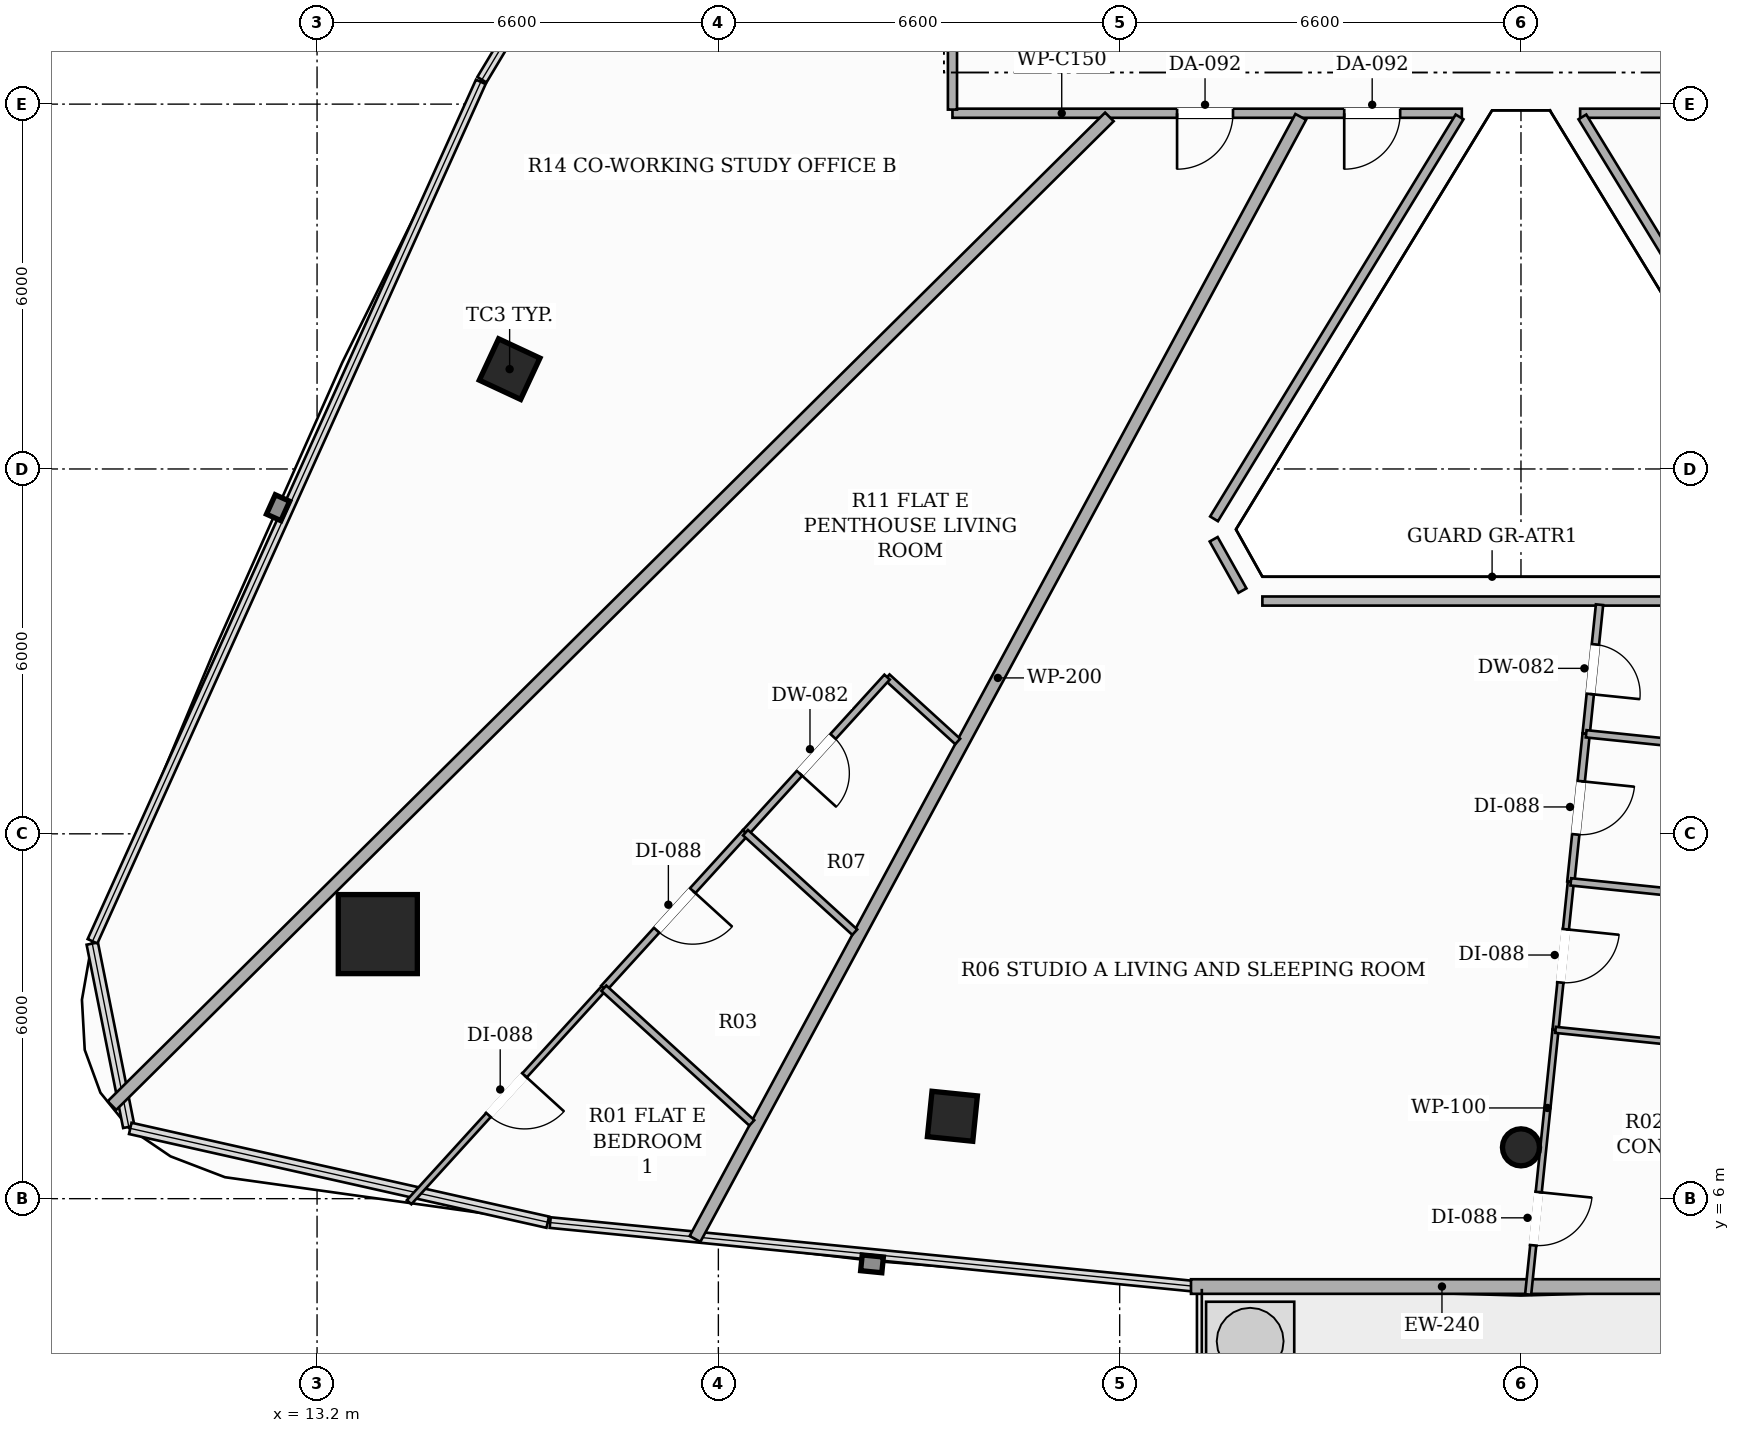
"""IFC4 building model, lengths in metres.
Left out: names, types, materials, properties, quantities, classifications, styles, units other than length and angle.
Written with IfcOpenShell. Run it as: python <this file> out.ifc"""

import sys

from ifc_helpers import new_model, si_unit, direction, frame, frame_2d, origin, origin_2d, place, context, subcontext, project, spatial, rectangle, hollow_rectangle, hollow_circle, extrude, element, fill, save


model = new_model("IFC4")
c1 = context("Model", 3, precision=1e-05, world=origin(), true_north=direction((0.0, 1.0)))
c2 = subcontext(c1, "Body", "Model", "MODEL_VIEW")
j1 = project(units=[si_unit("LENGTHUNIT", "METRE"), si_unit("PLANEANGLEUNIT", "RADIAN")], contexts=[c1])
p1 = place(None, origin())
s1 = spatial("IfcSite", under=j1, at=p1, CompositionType="ELEMENT")
p2 = place(p1, origin())
s2 = spatial("IfcBuilding", under=s1, at=p2, CompositionType="ELEMENT")
p3 = place(p2, frame((0.0, 0.0, 203.0)))
s3 = spatial("IfcBuildingStorey", under=s2, at=p3, CompositionType="ELEMENT", Elevation=203.0)
p4 = place(p3, frame((14.199, 10.351, 0.0), z_axis=(0.0, 0.0, 1.0), x_axis=(1.0, 0.0, 0.0)))
e1 = element("IfcColumn", 1, at=p4, inside=s3, PredefinedType="COLUMN", context=c2, shape_type="SweptSolid", body=[
    extrude(hollow_rectangle(XDim=1.3, YDim=1.3, WallThickness=0.04, at=origin_2d()), origin(), (0.0, 0.0, 1.0), 3.3),
])
for number, where, z_axis, x_axis in (
    (2, (16.367, 19.642, 0.0), (0.0, 0.0, 1.0), (0.423, 0.906, 0.0)),
    (3, (23.649, 7.355, 0.0), (0.0, 0.0, 1.0), (-0.995, 0.101, 0.0)),
):
    element("IfcColumn", number, at=place(p3, frame(where, z_axis=z_axis, x_axis=x_axis)), inside=s3, PredefinedType="COLUMN", context=c2, shape_type="SweptSolid", body=[
        extrude(hollow_rectangle(XDim=0.75, YDim=0.75, WallThickness=0.025, at=origin_2d()), origin(), (0.0, 0.0, 1.0), 3.3),
    ])
p5 = place(p3, frame((33.0, 6.844, 0.0), z_axis=(0.0, 0.0, 1.0), x_axis=(1.0, 0.0, 0.0)))
e4 = element("IfcColumn", 4, at=p5, inside=s3, PredefinedType="COLUMN", context=c2, shape_type="SweptSolid", body=[
    extrude(hollow_circle(Radius=0.305, WallThickness=0.016, at=origin_2d()), origin(), (0.0, 0.0, 1.0), 3.3),
])
p6 = place(p3, frame((27.573, 4.555, 0.0), z_axis=(0.0, 0.0, 1.0), x_axis=(1.0, 0.0, 0.0)))
e5 = element("IfcWall", 5, at=p6, inside=s3, PredefinedType="SOLIDWALL", context=c2, shape_type="SweptSolid", body=[
    extrude(rectangle(XDim=10.854, YDim=0.24, at=frame_2d((5.427, 0.0))), origin(), (0.0, 0.0, 1.0), 2.624),
])
p7 = place(p6, frame((8.355, 0.0, 0.0)))
e6 = element("IfcOpeningElement", 6, at=p7, cuts=e5, PredefinedType="OPENING", context=c2, shape_type="SweptSolid", body=[
    extrude(rectangle(XDim=1.8, YDim=2.2, at=frame_2d((0.9, 1.1))), frame((0.0, 0.13, 0.0), z_axis=(0.0, -1.0, 0.0), x_axis=(1.0, 0.0, 0.0)), (0.0, 0.0, 1.0), 0.26),
])
p8 = place(p3, frame((32.027, 23.85, 0.0), z_axis=(0.0, 0.0, 1.0), x_axis=(-1.0, 0.0, 0.0)))
e7 = element("IfcWall", 7, at=p8, inside=s3, PredefinedType="PARTITIONING", context=c2, shape_type="SweptSolid", body=[
    extrude(rectangle(XDim=8.377, YDim=0.15, at=frame_2d((4.188, 0.0))), origin(), (0.0, 0.0, 1.0), 2.565),
])
p9 = place(p8, frame((1.014, 0.0, 0.0)))
e8 = element("IfcOpeningElement", 8, at=p9, cuts=e7, PredefinedType="OPENING", context=c2, shape_type="SweptSolid", body=[
    extrude(rectangle(XDim=0.92, YDim=2.15, at=frame_2d((0.46, 1.075))), frame((0.0, 0.085, 0.0), z_axis=(0.0, -1.0, 0.0), x_axis=(1.0, 0.0, 0.0)), (0.0, 0.0, 1.0), 0.17),
])
p10 = place(p8, frame((3.763, 0.0, 0.0)))
e9 = element("IfcOpeningElement", 9, at=p10, cuts=e7, PredefinedType="OPENING", context=c2, shape_type="SweptSolid", body=[
    extrude(rectangle(XDim=0.92, YDim=2.15, at=frame_2d((0.46, 1.075))), frame((0.0, 0.085, 0.0), z_axis=(0.0, -1.0, 0.0), x_axis=(1.0, 0.0, 0.0)), (0.0, 0.0, 1.0), 0.17),
])
p11 = place(p3, frame((23.65, 23.91, 0.0), z_axis=(0.0, 0.0, 1.0), x_axis=(0.0, 1.0, 0.0)))
e10 = element("IfcWall", 10, at=p11, inside=s3, PredefinedType="PARTITIONING", context=c2, shape_type="SweptSolid", body=[
    extrude(rectangle(XDim=12.715, YDim=0.15, at=frame_2d((6.357, 0.0))), origin(), (0.0, 0.0, 1.0), 2.492),
])
p12 = place(p11, frame((5.917, 0.0, 0.0)))
e11 = element("IfcOpeningElement", 11, at=p12, cuts=e10, PredefinedType="OPENING", context=c2, shape_type="SweptSolid", body=[
    extrude(rectangle(XDim=0.88, YDim=2.1, at=frame_2d((0.44, 1.05))), frame((0.0, 0.085, 0.0), z_axis=(0.0, -1.0, 0.0), x_axis=(1.0, 0.0, 0.0)), (0.0, 0.0, 1.0), 0.17),
])
p13 = place(p3, frame((42.19, 23.85, 0.0), z_axis=(0.0, 0.0, 1.0), x_axis=(-1.0, 0.0, 0.0)))
e12 = element("IfcWall", 12, at=p13, inside=s3, PredefinedType="PARTITIONING", context=c2, shape_type="SweptSolid", body=[
    extrude(rectangle(XDim=8.217, YDim=0.15, at=frame_2d((4.108, 0.0))), origin(), (0.0, 0.0, 1.0), 2.565),
])
p14 = place(p13, frame((1.67, 0.0, 0.0)))
e13 = element("IfcOpeningElement", 13, at=p14, cuts=e12, PredefinedType="OPENING", context=c2, shape_type="SweptSolid", body=[
    extrude(rectangle(XDim=0.92, YDim=2.15, at=frame_2d((0.46, 1.075))), frame((0.0, 0.085, 0.0), z_axis=(0.0, -1.0, 0.0), x_axis=(1.0, 0.0, 0.0)), (0.0, 0.0, 1.0), 0.17),
])
p15 = place(p13, frame((5.12, 0.0, 0.0)))
e14 = element("IfcOpeningElement", 14, at=p15, cuts=e12, PredefinedType="OPENING", context=c2, shape_type="SweptSolid", body=[
    extrude(rectangle(XDim=0.88, YDim=2.1, at=frame_2d((0.44, 1.05))), frame((0.0, 0.085, 0.0), z_axis=(0.0, -1.0, 0.0), x_axis=(1.0, 0.0, 0.0)), (0.0, 0.0, 1.0), 0.17),
])
p16 = place(p3, frame((34.01, 23.79, 0.0), z_axis=(0.0, 0.0, 1.0), x_axis=(0.521316137909, -0.853363629618, 0.0)))
e15 = element("IfcWall", 15, at=p16, inside=s3, PredefinedType="PARTITIONING", context=c2, shape_type="SweptSolid", body=[
    extrude(rectangle(XDim=7.746, YDim=0.15, at=frame_2d((3.873, 0.0))), origin(), (0.0, 0.0, 1.0), 2.773),
])
p17 = place(p3, frame((37.253, 15.828, 0.0), z_axis=(0.0, 0.0, 1.0), x_axis=(-1.0, 0.0, 0.0)))
e16 = element("IfcWall", 16, at=p17, inside=s3, PredefinedType="PARTITIONING", context=c2, shape_type="SweptSolid", body=[
    extrude(rectangle(XDim=8.506, YDim=0.15, at=frame_2d((4.253, 0.0))), origin(), (0.0, 0.0, 1.0), 2.773),
])
p18 = place(p3, frame((28.419, 16.0, 0.0), z_axis=(0.0, 0.0, 1.0), x_axis=(-0.488810833005, 0.872389803664, 0.0)))
e17 = element("IfcWall", 17, at=p18, inside=s3, PredefinedType="PARTITIONING", context=c2, shape_type="SweptSolid", body=[
    extrude(rectangle(XDim=0.968, YDim=0.15, at=frame_2d((0.484, 0.0))), origin(), (0.0, 0.0, 1.0), 3.06),
])
p19 = place(p3, frame((27.952, 17.18, 0.0), z_axis=(0.0, 0.0, 1.0), x_axis=(0.521316137909, 0.853363629618, 0.0)))
e18 = element("IfcWall", 18, at=p19, inside=s3, PredefinedType="PARTITIONING", context=c2, shape_type="SweptSolid", body=[
    extrude(rectangle(XDim=7.746, YDim=0.15, at=frame_2d((3.873, 0.0))), origin(), (0.0, 0.0, 1.0), 2.773),
])
p20 = place(p3, frame((19.416, 5.338, 0.0), z_axis=(0.0, 0.0, 1.0), x_axis=(0.475065982754, 0.879950175879, 0.0)))
e19 = element("IfcWall", 19, at=p20, inside=s3, PredefinedType="PARTITIONING", context=c2, shape_type="SweptSolid", body=[
    extrude(rectangle(XDim=20.969, YDim=0.2, at=frame_2d((10.485, 0.0))), origin(), (0.0, 0.0, 1.0), 2.492),
])
p21 = place(p3, frame((26.231, 23.79, 0.0), z_axis=(0.0, 0.0, 1.0), x_axis=(-0.710239236144, -0.703960387693, 0.0)))
e20 = element("IfcWall", 20, at=p21, inside=s3, PredefinedType="PARTITIONING", context=c2, shape_type="SweptSolid", body=[
    extrude(rectangle(XDim=23.096, YDim=0.2, at=frame_2d((11.548, 0.0))), origin(), (0.0, 0.0, 1.0), 2.492),
])
p22 = place(p3, frame((34.292, 15.768, 0.0), z_axis=(0.0, 0.0, 1.0), x_axis=(-0.103059151492, -0.994675229054, 0.0)))
e21 = element("IfcWall", 21, at=p22, inside=s3, PredefinedType="PARTITIONING", context=c2, shape_type="SweptSolid", body=[
    extrude(rectangle(XDim=2.135, YDim=0.12, at=frame_2d((1.067, 0.0))), origin(), (0.0, 0.0, 1.0), 3.06),
])
p23 = place(p22, frame((0.657, 0.0, 0.0)))
e22 = element("IfcOpeningElement", 22, at=p23, cuts=e21, PredefinedType="OPENING", context=c2, shape_type="SweptSolid", body=[
    extrude(rectangle(XDim=0.82, YDim=2.1, at=frame_2d((0.41, 1.05))), frame((0.0, 0.07, 0.0), z_axis=(0.0, -1.0, 0.0), x_axis=(1.0, 0.0, 0.0)), (0.0, 0.0, 1.0), 0.14),
])
p24 = place(p3, frame((34.072, 13.645, 0.0), z_axis=(0.0, 0.0, 1.0), x_axis=(-0.102919566026, -0.994689681724, 0.0)))
e23 = element("IfcWall", 23, at=p24, inside=s3, PredefinedType="PARTITIONING", context=c2, shape_type="SweptSolid", body=[
    extrude(rectangle(XDim=2.448, YDim=0.12, at=frame_2d((1.224, 0.0))), origin(), (0.0, 0.0, 1.0), 3.06),
])
p25 = place(p24, frame((0.784, 0.0, 0.0)))
e24 = element("IfcOpeningElement", 24, at=p25, cuts=e23, PredefinedType="OPENING", context=c2, shape_type="SweptSolid", body=[
    extrude(rectangle(XDim=0.88, YDim=2.1, at=frame_2d((0.44, 1.05))), frame((0.0, 0.07, 0.0), z_axis=(0.0, -1.0, 0.0), x_axis=(1.0, 0.0, 0.0)), (0.0, 0.0, 1.0), 0.14),
])
p26 = place(p3, frame((33.568, 8.776, 0.0), z_axis=(0.0, 0.0, 1.0), x_axis=(-0.1029239069, -0.994689232569, 0.0)))
e25 = element("IfcWall", 25, at=p26, inside=s3, PredefinedType="PARTITIONING", context=c2, shape_type="SweptSolid", body=[
    extrude(rectangle(XDim=4.374, YDim=0.1, at=frame_2d((2.187, 0.0))), origin(), (0.0, 0.0, 1.0), 2.492),
])
p27 = place(p26, frame((2.682, 0.0, 0.0)))
e26 = element("IfcOpeningElement", 26, at=p27, cuts=e25, PredefinedType="OPENING", context=c2, shape_type="SweptSolid", body=[
    extrude(rectangle(XDim=0.88, YDim=2.1, at=frame_2d((0.44, 1.05))), frame((0.0, 0.06, 0.0), z_axis=(0.0, -1.0, 0.0), x_axis=(1.0, 0.0, 0.0)), (0.0, 0.0, 1.0), 0.12),
])
p28 = place(p3, frame((33.82, 11.21, 0.0), z_axis=(0.0, 0.0, 1.0), x_axis=(-0.102960420087, -0.994685453747, 0.0)))
e27 = element("IfcWall", 27, at=p28, inside=s3, PredefinedType="PARTITIONING", context=c2, shape_type="SweptSolid", body=[
    extrude(rectangle(XDim=2.447, YDim=0.1, at=frame_2d((1.224, 0.0))), origin(), (0.0, 0.0, 1.0), 3.06),
])
p29 = place(p28, frame((0.784, 0.0, 0.0)))
e28 = element("IfcOpeningElement", 28, at=p29, cuts=e27, PredefinedType="OPENING", context=c2, shape_type="SweptSolid", body=[
    extrude(rectangle(XDim=0.88, YDim=2.1, at=frame_2d((0.44, 1.05))), frame((0.0, 0.06, 0.0), z_axis=(0.0, -1.0, 0.0), x_axis=(1.0, 0.0, 0.0)), (0.0, 0.0, 1.0), 0.12),
])
p30 = place(p3, frame((38.025, 13.236, 0.0), z_axis=(0.0, 0.0, 1.0), x_axis=(-0.99469136016, 0.102903343108, 0.0)))
e29 = element("IfcWall", 29, at=p30, inside=s3, PredefinedType="PARTITIONING", context=c2, shape_type="SweptSolid", body=[
    extrude(rectangle(XDim=3.974, YDim=0.12, at=frame_2d((1.987, 0.0))), origin(), (0.0, 0.0, 1.0), 2.773),
])
p31 = place(p3, frame((38.777, 10.698, 0.0), z_axis=(0.0, 0.0, 1.0), x_axis=(-0.994708898019, 0.102733676081, 0.0)))
e30 = element("IfcWall", 30, at=p31, inside=s3, PredefinedType="PARTITIONING", context=c2, shape_type="SweptSolid", body=[
    extrude(rectangle(XDim=4.983, YDim=0.12, at=frame_2d((2.492, 0.0))), origin(), (0.0, 0.0, 1.0), 2.773),
])
p32 = place(p3, frame((33.568, 8.776, 0.0), z_axis=(0.0, 0.0, 1.0), x_axis=(0.994686760155, -0.102947798284, 0.0)))
e31 = element("IfcWall", 31, at=p32, inside=s3, PredefinedType="PARTITIONING", context=c2, shape_type="SweptSolid", body=[
    extrude(rectangle(XDim=5.993, YDim=0.1, at=frame_2d((2.996, 0.0))), origin(), (0.0, 0.0, 1.0), 2.773),
])
p33 = place(p3, frame((23.736, 13.519, 0.0), z_axis=(0.0, 0.0, 1.0), x_axis=(-0.739215251716, 0.673469235846, 0.0)))
e32 = element("IfcWall", 32, at=p33, inside=s3, PredefinedType="PARTITIONING", context=c2, shape_type="SweptSolid", body=[
    extrude(rectangle(XDim=1.571, YDim=0.12, at=frame_2d((0.785, 0.0))), origin(), (0.0, 0.0, 1.0), 3.06),
])
p34 = place(p3, frame((22.575, 14.577, 0.0), z_axis=(0.0, 0.0, 1.0), x_axis=(-0.673231148277, -0.739432093563, 0.0)))
e33 = element("IfcWall", 33, at=p34, inside=s3, PredefinedType="PARTITIONING", context=c2, shape_type="SweptSolid", body=[
    extrude(rectangle(XDim=3.459, YDim=0.12, at=frame_2d((1.729, 0.0))), origin(), (0.0, 0.0, 1.0), 2.773),
])
p35 = place(p34, frame((1.32, 0.0, 0.0)))
e34 = element("IfcOpeningElement", 34, at=p35, cuts=e33, PredefinedType="OPENING", context=c2, shape_type="SweptSolid", body=[
    extrude(rectangle(XDim=0.82, YDim=2.1, at=frame_2d((0.41, 1.05))), frame((0.0, 0.07, 0.0), z_axis=(0.0, -1.0, 0.0), x_axis=(1.0, 0.0, 0.0)), (0.0, 0.0, 1.0), 0.14),
])
p36 = place(p3, frame((20.246, 12.019, 0.0), z_axis=(0.0, 0.0, 1.0), x_axis=(-0.673234602732, -0.739428948368, 0.0)))
e35 = element("IfcWall", 35, at=p36, inside=s3, PredefinedType="PARTITIONING", context=c2, shape_type="SweptSolid", body=[
    extrude(rectangle(XDim=3.459, YDim=0.12, at=frame_2d((1.73, 0.0))), origin(), (0.0, 0.0, 1.0), 2.492),
])
p37 = place(p36, frame((1.29, 0.0, 0.0)))
e36 = element("IfcOpeningElement", 36, at=p37, cuts=e35, PredefinedType="OPENING", context=c2, shape_type="SweptSolid", body=[
    extrude(rectangle(XDim=0.88, YDim=2.1, at=frame_2d((0.44, 1.05))), frame((0.0, 0.07, 0.0), z_axis=(0.0, -1.0, 0.0), x_axis=(1.0, 0.0, 0.0)), (0.0, 0.0, 1.0), 0.14),
])
p38 = place(p3, frame((17.917, 9.461, 0.0), z_axis=(0.0, 0.0, 1.0), x_axis=(-0.673104266943, -0.739547595374, 0.0)))
e37 = element("IfcWall", 37, at=p38, inside=s3, PredefinedType="PARTITIONING", context=c2, shape_type="SweptSolid", body=[
    extrude(rectangle(XDim=4.758, YDim=0.1, at=frame_2d((2.379, 0.0))), origin(), (0.0, 0.0, 1.0), 2.492),
])
p39 = place(p38, frame((1.939, 0.0, 0.0)))
e38 = element("IfcOpeningElement", 38, at=p39, cuts=e37, PredefinedType="OPENING", context=c2, shape_type="SweptSolid", body=[
    extrude(rectangle(XDim=0.88, YDim=2.1, at=frame_2d((0.44, 1.05))), frame((0.0, 0.06, 0.0), z_axis=(0.0, -1.0, 0.0), x_axis=(1.0, 0.0, 0.0)), (0.0, 0.0, 1.0), 0.12),
])
p40 = place(p3, frame((22.043, 10.383, 0.0), z_axis=(0.0, 0.0, 1.0), x_axis=(-0.739435258465, 0.673227672143, 0.0)))
e39 = element("IfcWall", 39, at=p40, inside=s3, PredefinedType="PARTITIONING", context=c2, shape_type="SweptSolid", body=[
    extrude(rectangle(XDim=2.43, YDim=0.12, at=frame_2d((1.215, 0.0))), origin(), (0.0, 0.0, 1.0), 2.773),
])
p41 = place(p3, frame((20.35, 7.246, 0.0), z_axis=(0.0, 0.0, 1.0), x_axis=(-0.739496715577, 0.673160164932, 0.0)))
e40 = element("IfcWall", 40, at=p41, inside=s3, PredefinedType="PARTITIONING", context=c2, shape_type="SweptSolid", body=[
    extrude(rectangle(XDim=3.29, YDim=0.12, at=frame_2d((1.645, 0.0))), origin(), (0.0, 0.0, 1.0), 2.492),
])
p42 = place(p9, origin())
e41 = element("IfcDoor", 41, at=p42, inside=s3, OperationType="SINGLE_SWING_RIGHT", PredefinedType="DOOR", context=c2, shape_type="SweptSolid", body=[
    extrude(rectangle(XDim=0.92, YDim=2.15, at=frame_2d((0.46, 1.075))), frame((0.0, 0.025, 0.0), z_axis=(0.0, -1.0, 0.0), x_axis=(1.0, 0.0, 0.0)), (0.0, 0.0, 1.0), 0.05),
])
fill(e8, e41)
p43 = place(p23, origin())
e42 = element("IfcDoor", 42, at=p43, inside=s3, OperationType="SINGLE_SWING_RIGHT", PredefinedType="DOOR", context=c2, shape_type="SweptSolid", body=[
    extrude(rectangle(XDim=0.82, YDim=2.1, at=frame_2d((0.41, 1.05))), frame((0.0, 0.025, 0.0), z_axis=(0.0, -1.0, 0.0), x_axis=(1.0, 0.0, 0.0)), (0.0, 0.0, 1.0), 0.05),
])
fill(e22, e42)
p44 = place(p25, origin())
e43 = element("IfcDoor", 43, at=p44, inside=s3, OperationType="SINGLE_SWING_LEFT", PredefinedType="DOOR", context=c2, shape_type="SweptSolid", body=[
    extrude(rectangle(XDim=0.88, YDim=2.1, at=frame_2d((0.44, 1.05))), frame((0.0, 0.025, 0.0), z_axis=(0.0, -1.0, 0.0), x_axis=(1.0, 0.0, 0.0)), (0.0, 0.0, 1.0), 0.05),
])
fill(e24, e43)
p45 = place(p27, origin())
e44 = element("IfcDoor", 44, at=p45, inside=s3, OperationType="SINGLE_SWING_LEFT", PredefinedType="DOOR", context=c2, shape_type="SweptSolid", body=[
    extrude(rectangle(XDim=0.88, YDim=2.1, at=frame_2d((0.44, 1.05))), frame((0.0, 0.025, 0.0), z_axis=(0.0, -1.0, 0.0), x_axis=(1.0, 0.0, 0.0)), (0.0, 0.0, 1.0), 0.05),
])
fill(e26, e44)
p46 = place(p29, origin())
e45 = element("IfcDoor", 45, at=p46, inside=s3, OperationType="SINGLE_SWING_LEFT", PredefinedType="DOOR", context=c2, shape_type="SweptSolid", body=[
    extrude(rectangle(XDim=0.88, YDim=2.1, at=frame_2d((0.44, 1.05))), frame((0.0, 0.025, 0.0), z_axis=(0.0, -1.0, 0.0), x_axis=(1.0, 0.0, 0.0)), (0.0, 0.0, 1.0), 0.05),
])
fill(e28, e45)
p47 = place(p10, origin())
e46 = element("IfcDoor", 46, at=p47, inside=s3, OperationType="SINGLE_SWING_RIGHT", PredefinedType="DOOR", context=c2, shape_type="SweptSolid", body=[
    extrude(rectangle(XDim=0.92, YDim=2.15, at=frame_2d((0.46, 1.075))), frame((0.0, 0.025, 0.0), z_axis=(0.0, -1.0, 0.0), x_axis=(1.0, 0.0, 0.0)), (0.0, 0.0, 1.0), 0.05),
])
fill(e9, e46)
p48 = place(p35, origin())
e47 = element("IfcDoor", 47, at=p48, inside=s3, OperationType="SINGLE_SWING_RIGHT", PredefinedType="DOOR", context=c2, shape_type="SweptSolid", body=[
    extrude(rectangle(XDim=0.82, YDim=2.1, at=frame_2d((0.41, 1.05))), frame((0.0, 0.025, 0.0), z_axis=(0.0, -1.0, 0.0), x_axis=(1.0, 0.0, 0.0)), (0.0, 0.0, 1.0), 0.05),
])
fill(e34, e47)
p49 = place(p37, origin())
e48 = element("IfcDoor", 48, at=p49, inside=s3, OperationType="SINGLE_SWING_LEFT", PredefinedType="DOOR", context=c2, shape_type="SweptSolid", body=[
    extrude(rectangle(XDim=0.88, YDim=2.1, at=frame_2d((0.44, 1.05))), frame((0.0, 0.025, 0.0), z_axis=(0.0, -1.0, 0.0), x_axis=(1.0, 0.0, 0.0)), (0.0, 0.0, 1.0), 0.05),
])
fill(e36, e48)
p50 = place(p39, origin())
e49 = element("IfcDoor", 49, at=p50, inside=s3, OperationType="SINGLE_SWING_LEFT", PredefinedType="DOOR", context=c2, shape_type="SweptSolid", body=[
    extrude(rectangle(XDim=0.88, YDim=2.1, at=frame_2d((0.44, 1.05))), frame((0.0, 0.025, 0.0), z_axis=(0.0, -1.0, 0.0), x_axis=(1.0, 0.0, 0.0)), (0.0, 0.0, 1.0), 0.05),
])
fill(e38, e49)
save(model, sys.argv[1])
